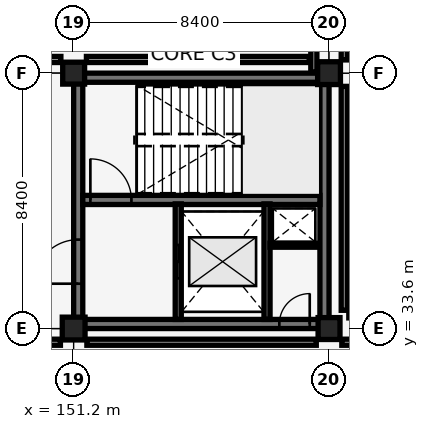
"""IFC4 building model, lengths in metres.
Left out: names, types, materials, properties, quantities, classifications, styles, units other than length and angle.
Written with IfcOpenShell. Run it as: python <this file> out.ifc"""

import sys

from ifc_helpers import new_model, si_unit, direction, frame, frame_2d, origin, origin_2d, place, context, subcontext, project, spatial, rectangle, extrude, element, fill, save


model = new_model("IFC4")
c1 = context("Model", 3, precision=1e-05, world=origin(), true_north=direction((0.0, 1.0)))
c2 = subcontext(c1, "Body", "Model", "MODEL_VIEW")
j1 = project(units=[si_unit("LENGTHUNIT", "METRE"), si_unit("PLANEANGLEUNIT", "RADIAN")], contexts=[c1])
p1 = place(None, origin())
s1 = spatial("IfcSite", under=j1, at=p1, CompositionType="ELEMENT")
p2 = place(p1, origin())
s2 = spatial("IfcBuilding", under=s1, at=p2, CompositionType="ELEMENT")
p3 = place(p2, frame((0.0, 0.0, 5.44)))
s3 = spatial("IfcBuildingStorey", under=s2, at=p3, CompositionType="ELEMENT", Elevation=5.44)
p4 = place(p3, frame((151.35, 33.75, 0.0), z_axis=(0.0, 0.0, 1.0), x_axis=(1.0, 0.0, 0.0)))
e1 = element("IfcWall", 1, at=p4, inside=s3, PredefinedType="SHEAR", context=c2, shape_type="SweptSolid", body=[
    extrude(rectangle(XDim=8.1, YDim=0.3, at=frame_2d((4.05, 0.0))), origin(), (0.0, 0.0, 1.0), 4.12),
])
p5 = place(p4, frame((6.615, 0.0, 0.0)))
e2 = element("IfcOpeningElement", 2, at=p5, cuts=e1, PredefinedType="OPENING", context=c2, shape_type="SweptSolid", body=[
    extrude(rectangle(XDim=1.0, YDim=2.15, at=frame_2d((0.5, 1.075))), frame((0.0, 0.16, 0.0), z_axis=(0.0, -1.0, 0.0), x_axis=(1.0, 0.0, 0.0)), (0.0, 0.0, 1.0), 0.32),
])
p6 = place(p3, frame((151.35, 41.85, 0.0), z_axis=(0.0, 0.0, 1.0), x_axis=(1.0, 0.0, 0.0)))
e3 = element("IfcWall", 3, at=p6, inside=s3, PredefinedType="SHEAR", context=c2, shape_type="SweptSolid", body=[
    extrude(rectangle(XDim=8.1, YDim=0.3, at=frame_2d((4.05, 0.0))), origin(), (0.0, 0.0, 1.0), 4.12),
])
p7 = place(p3, frame((151.35, 33.75, 0.0), z_axis=(0.0, 0.0, 1.0), x_axis=(0.0, 1.0, 0.0)))
e4 = element("IfcWall", 4, at=p7, inside=s3, PredefinedType="SHEAR", context=c2, shape_type="SweptSolid", body=[
    extrude(rectangle(XDim=8.1, YDim=0.3, at=frame_2d((4.05, 0.0))), origin(), (0.0, 0.0, 1.0), 4.12),
])
p8 = place(p7, frame((1.325, 0.0, 0.0)))
e5 = element("IfcOpeningElement", 5, at=p8, cuts=e4, PredefinedType="OPENING", context=c2, shape_type="SweptSolid", body=[
    extrude(rectangle(XDim=1.45, YDim=2.15, at=frame_2d((0.725, 1.075))), frame((0.0, 0.16, 0.0), z_axis=(0.0, -1.0, 0.0), x_axis=(1.0, 0.0, 0.0)), (0.0, 0.0, 1.0), 0.32),
])
p9 = place(p3, frame((159.45, 33.75, 0.0), z_axis=(0.0, 0.0, 1.0), x_axis=(0.0, 1.0, 0.0)))
e6 = element("IfcWall", 6, at=p9, inside=s3, PredefinedType="SHEAR", context=c2, shape_type="SweptSolid", body=[
    extrude(rectangle(XDim=8.1, YDim=0.3, at=frame_2d((4.05, 0.0))), origin(), (0.0, 0.0, 1.0), 4.12),
])
p10 = place(p3, frame((151.5, 37.83, 0.0), z_axis=(0.0, 0.0, 1.0), x_axis=(1.0, 0.0, 0.0)))
e7 = element("IfcWall", 7, at=p10, inside=s3, PredefinedType="SHEAR", context=c2, shape_type="SweptSolid", body=[
    extrude(rectangle(XDim=7.8, YDim=0.3, at=frame_2d((3.9, 0.0))), origin(), (0.0, 0.0, 1.0), 4.12),
])
p11 = place(p10, frame((0.25, 0.0, 0.0)))
e8 = element("IfcOpeningElement", 8, at=p11, cuts=e7, PredefinedType="OPENING", context=c2, shape_type="SweptSolid", body=[
    extrude(rectangle(XDim=1.35, YDim=2.15, at=frame_2d((0.675, 1.075))), frame((0.0, 0.16, 0.0), z_axis=(0.0, -1.0, 0.0), x_axis=(1.0, 0.0, 0.0)), (0.0, 0.0, 1.0), 0.32),
])
p12 = place(p3, frame((151.2, 33.6, 0.0), z_axis=(0.0, 0.0, 1.0), x_axis=(1.0, 0.0, 0.0)))
e9 = element("IfcColumn", 9, at=p12, inside=s3, PredefinedType="COLUMN", context=c2, shape_type="SweptSolid", body=[
    extrude(rectangle(XDim=0.75, YDim=0.75, at=origin_2d()), origin(), (0.0, 0.0, 1.0), 4.12),
])
for number, where, z_axis, x_axis in (
    (10, (151.2, 42.0, 0.0), (0.0, 0.0, 1.0), (1.0, 0.0, 0.0)),
    (11, (159.6, 33.6, 0.0), (0.0, 0.0, 1.0), (1.0, 0.0, 0.0)),
):
    element("IfcColumn", number, at=place(p3, frame(where, z_axis=z_axis, x_axis=x_axis)), inside=s3, PredefinedType="COLUMN", context=c2, shape_type="SweptSolid", body=[
        extrude(rectangle(XDim=0.72, YDim=0.72, at=origin_2d()), origin(), (0.0, 0.0, 1.0), 4.12),
    ])
p13 = place(p3, frame((159.6, 42.0, 0.0), z_axis=(0.0, 0.0, 1.0), x_axis=(1.0, 0.0, 0.0)))
e12 = element("IfcColumn", 12, at=p13, inside=s3, PredefinedType="COLUMN", context=c2, shape_type="SweptSolid", body=[
    extrude(rectangle(XDim=0.75, YDim=0.75, at=origin_2d()), origin(), (0.0, 0.0, 1.0), 4.12),
])
p14 = place(p3, frame((154.64, 33.9, 0.0), z_axis=(0.0, 0.0, 1.0), x_axis=(0.0, 1.0, 0.0)))
e13 = element("IfcWall", 13, at=p14, inside=s3, PredefinedType="SHEAR", context=c2, shape_type="SweptSolid", body=[
    extrude(rectangle(XDim=3.8, YDim=0.2, at=frame_2d((1.9, 0.0))), origin(), (0.0, 0.0, 1.0), 3.34),
])
p15 = place(p14, frame((1.35, 0.0, 0.0)))
e14 = element("IfcOpeningElement", 14, at=p15, cuts=e13, PredefinedType="OPENING", context=c2, shape_type="SweptSolid", body=[
    extrude(rectangle(XDim=1.1, YDim=2.15, at=frame_2d((0.55, 1.075))), frame((0.0, 0.11, 0.0), z_axis=(0.0, -1.0, 0.0), x_axis=(1.0, 0.0, 0.0)), (0.0, 0.0, 1.0), 0.22),
])
p16 = place(p3, frame((157.56, 33.9, 0.0), z_axis=(0.0, 0.0, 1.0), x_axis=(0.0, 1.0, 0.0)))
e15 = element("IfcWall", 15, at=p16, inside=s3, PredefinedType="SHEAR", context=c2, shape_type="SweptSolid", body=[
    extrude(rectangle(XDim=3.8, YDim=0.2, at=frame_2d((1.9, 0.0))), origin(), (0.0, 0.0, 1.0), 3.34),
])
p17 = place(p3, frame((157.66, 36.34, 0.0), z_axis=(0.0, 0.0, 1.0), x_axis=(1.0, 0.0, 0.0)))
e16 = element("IfcWall", 16, at=p17, inside=s3, PredefinedType="PARTITIONING", context=c2, shape_type="SweptSolid", body=[
    extrude(rectangle(XDim=1.62, YDim=0.13, at=frame_2d((0.81, 0.0))), origin(), (0.0, 0.0, 1.0), 4.12),
])
for number, where, z_axis, x_axis in (
    (17, (143.22, 33.15, 0.0), (0.0, 0.0, 1.0), (1.0, 0.0, 0.0)),
    (18, (151.635, 33.15, 0.0), (0.0, 0.0, 1.0), (1.0, 0.0, 0.0)),
):
    element("IfcWall", number, at=place(p3, frame(where, z_axis=z_axis, x_axis=x_axis)), inside=s3, PredefinedType="PARTITIONING", context=c2, shape_type="SweptSolid", body=[
        extrude(rectangle(XDim=7.545, YDim=0.2, at=frame_2d((3.772, 0.0))), origin(), (0.0, 0.0, 1.0), 4.12),
    ])
p18 = place(p3, frame((160.02, 33.15, 0.0), z_axis=(0.0, 0.0, 1.0), x_axis=(1.0, 0.0, 0.0)))
e19 = element("IfcWall", 19, at=p18, inside=s3, PredefinedType="PARTITIONING", context=c2, shape_type="SweptSolid", body=[
    extrude(rectangle(XDim=7.8, YDim=0.2, at=frame_2d((3.9, 0.0))), origin(), (0.0, 0.0, 1.0), 3.37),
])
p19 = place(p3, frame((143.235, 42.45, 0.0), z_axis=(0.0, 0.0, 1.0), x_axis=(1.0, 0.0, 0.0)))
e20 = element("IfcWall", 20, at=p19, inside=s3, PredefinedType="PARTITIONING", context=c2, shape_type="SweptSolid", body=[
    extrude(rectangle(XDim=7.545, YDim=0.2, at=frame_2d((3.772, 0.0))), origin(), (0.0, 0.0, 1.0), 4.12),
])
p20 = place(p3, frame((151.62, 42.45, 0.0), z_axis=(0.0, 0.0, 1.0), x_axis=(1.0, 0.0, 0.0)))
e21 = element("IfcWall", 21, at=p20, inside=s3, PredefinedType="PARTITIONING", context=c2, shape_type="SweptSolid", body=[
    extrude(rectangle(XDim=7.33, YDim=0.2, at=frame_2d((3.665, 0.0))), origin(), (0.0, 0.0, 1.0), 4.12),
])
p21 = place(p3, frame((159.1, 42.03, 0.0), z_axis=(0.0, 0.0, 1.0), x_axis=(0.0, 1.0, 0.0)))
e22 = element("IfcWall", 22, at=p21, inside=s3, PredefinedType="PARTITIONING", context=c2, shape_type="SweptSolid", body=[
    extrude(rectangle(XDim=7.95, YDim=0.2, at=frame_2d((3.975, 0.0))), origin(), (0.0, 0.0, 1.0), 3.44),
])
p22 = place(p3, frame((160.25, 34.05, 0.0), z_axis=(0.0, 0.0, 1.0), x_axis=(1.0, 0.0, 0.0)))
e23 = element("IfcWall", 23, at=p22, inside=s3, PredefinedType="PARTITIONING", context=c2, shape_type="SweptSolid", body=[
    extrude(rectangle(XDim=7.57, YDim=0.2, at=frame_2d((3.785, 0.0))), origin(), (0.0, 0.0, 1.0), 3.37),
])
p23 = place(p3, frame((160.1, 34.2, 0.0), z_axis=(0.0, 0.0, 1.0), x_axis=(0.0, 1.0, 0.0)))
e24 = element("IfcWall", 24, at=p23, inside=s3, PredefinedType="PARTITIONING", context=c2, shape_type="SweptSolid", body=[
    extrude(rectangle(XDim=7.365, YDim=0.2, at=frame_2d((3.683, 0.0))), origin(), (0.0, 0.0, 1.0), 3.62),
])
p24 = place(p3, frame((160.1, 42.435, 0.0), z_axis=(0.0, 0.0, 1.0), x_axis=(0.0, 1.0, 0.0)))
e25 = element("IfcWall", 25, at=p24, inside=s3, PredefinedType="PARTITIONING", context=c2, shape_type="SweptSolid", body=[
    extrude(rectangle(XDim=7.545, YDim=0.2, at=frame_2d((3.772, 0.0))), origin(), (0.0, 0.0, 1.0), 3.6),
])
p25 = place(p11, origin())
e26 = element("IfcDoor", 26, at=p25, inside=s3, OperationType="SINGLE_SWING_LEFT", PredefinedType="DOOR", context=c2, shape_type="SweptSolid", body=[
    extrude(rectangle(XDim=1.35, YDim=2.15, at=frame_2d((0.675, 1.075))), frame((0.0, 0.025, 0.0), z_axis=(0.0, -1.0, 0.0), x_axis=(1.0, 0.0, 0.0)), (0.0, 0.0, 1.0), 0.05),
])
fill(e8, e26)
p26 = place(p15, origin())
e27 = element("IfcDoor", 27, at=p26, inside=s3, OperationType="SLIDING_TO_LEFT", PredefinedType="DOOR", context=c2, shape_type="SweptSolid", body=[
    extrude(rectangle(XDim=1.1, YDim=2.15, at=frame_2d((0.55, 1.075))), frame((0.0, 0.025, 0.0), z_axis=(0.0, -1.0, 0.0), x_axis=(1.0, 0.0, 0.0)), (0.0, 0.0, 1.0), 0.05),
])
fill(e14, e27)
p27 = place(p8, origin())
e28 = element("IfcDoor", 28, at=p27, inside=s3, OperationType="DOUBLE_DOOR_SINGLE_SWING", PredefinedType="DOOR", context=c2, shape_type="SweptSolid", body=[
    extrude(rectangle(XDim=1.45, YDim=2.15, at=frame_2d((0.725, 1.075))), frame((0.0, 0.025, 0.0), z_axis=(0.0, -1.0, 0.0), x_axis=(1.0, 0.0, 0.0)), (0.0, 0.0, 1.0), 0.05),
])
fill(e5, e28)
p28 = place(p5, origin())
e29 = element("IfcDoor", 29, at=p28, inside=s3, OperationType="SINGLE_SWING_RIGHT", PredefinedType="DOOR", context=c2, shape_type="SweptSolid", body=[
    extrude(rectangle(XDim=1.0, YDim=2.15, at=frame_2d((0.5, 1.075))), frame((0.0, 0.025, 0.0), z_axis=(0.0, -1.0, 0.0), x_axis=(1.0, 0.0, 0.0)), (0.0, 0.0, 1.0), 0.05),
])
fill(e2, e29)
save(model, sys.argv[1])
